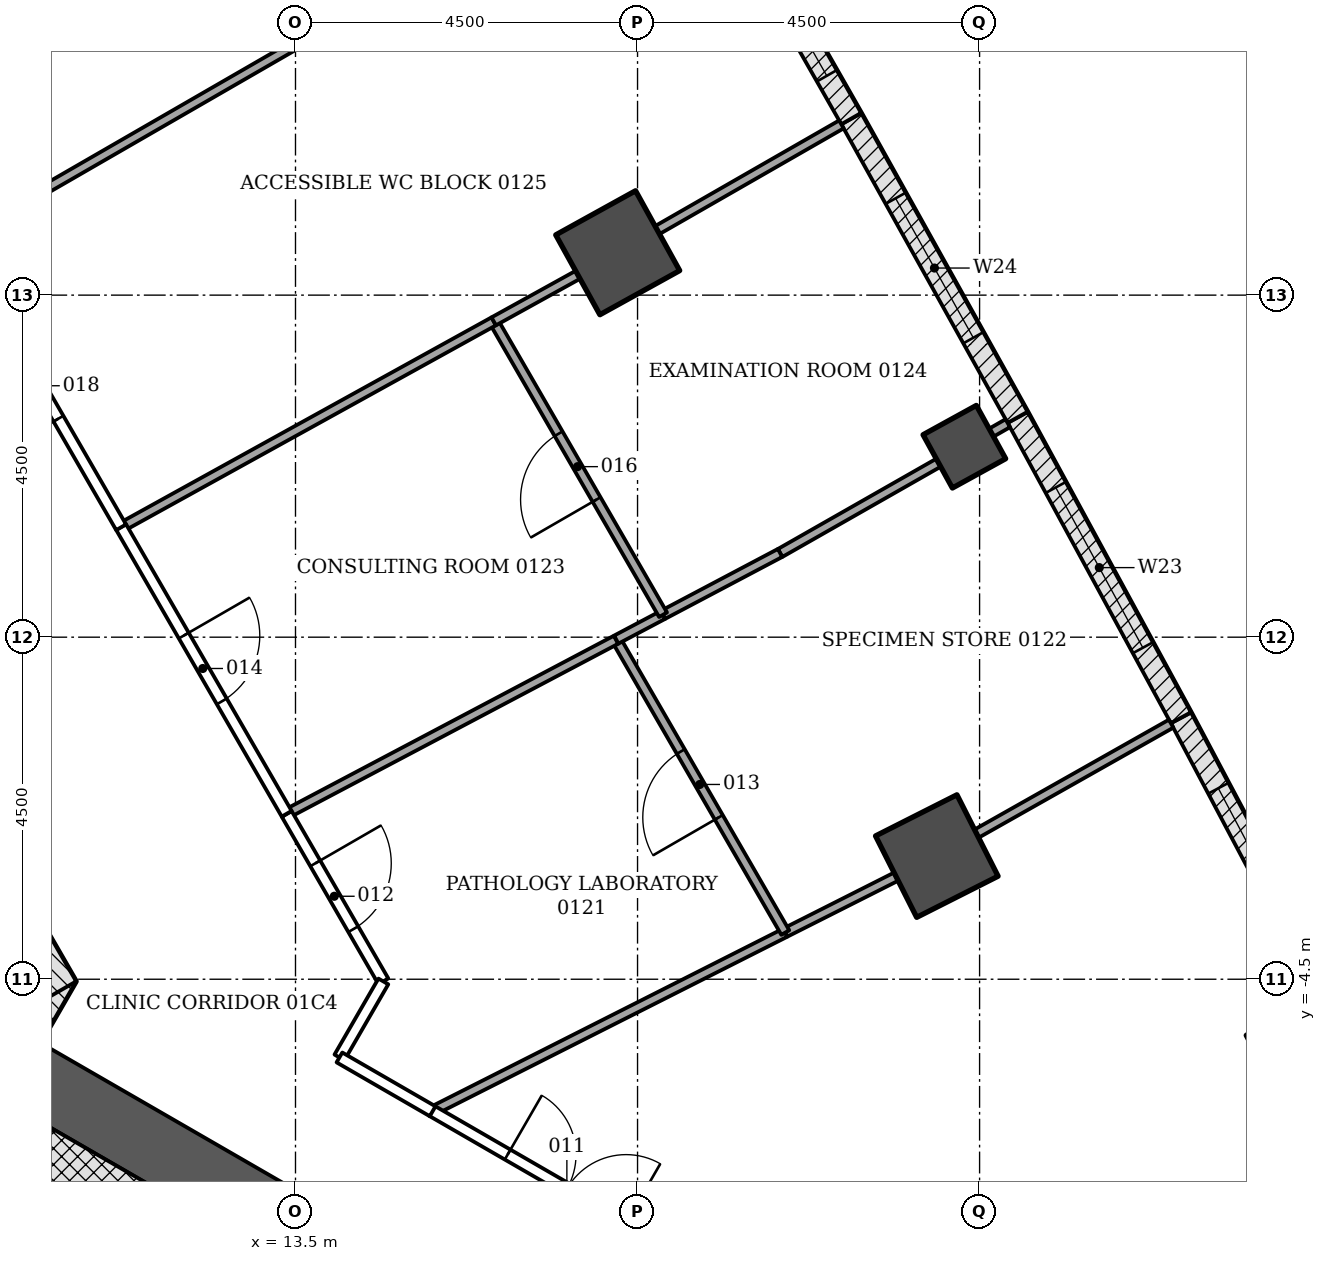
"""IFC4 building model, lengths in metres.
Left out: names, types, materials, properties, quantities, classifications, styles, units other than length and angle.
Written with IfcOpenShell. Run it as: python <this file> out.ifc"""

import sys

from ifc_helpers import new_model, si_unit, direction, frame, frame_2d, origin, origin_2d, place, context, subcontext, project, spatial, rectangle, extrude, element, fill, save


model = new_model("IFC4")
c1 = context("Model", 3, precision=1e-05, world=origin(), true_north=direction((0.0, 1.0)))
c2 = subcontext(c1, "Body", "Model", "MODEL_VIEW")
j1 = project(units=[si_unit("LENGTHUNIT", "METRE"), si_unit("PLANEANGLEUNIT", "RADIAN")], contexts=[c1])
p1 = place(None, origin())
s1 = spatial("IfcSite", under=j1, at=p1, CompositionType="ELEMENT")
p2 = place(p1, origin())
s2 = spatial("IfcBuilding", under=s1, at=p2, CompositionType="ELEMENT")
p3 = place(p2, frame((0.0, 0.0, 6.0)))
s3 = spatial("IfcBuildingStorey", under=s2, at=p3, CompositionType="ELEMENT", Elevation=6.0)
for number, where, z_axis, x_axis in (
    (1, (21.937, -2.88, -0.25), (0.0, 0.0, 1.0), (0.893, 0.451, 0.0)),
    (2, (17.739, 5.058, -0.25), (0.0, 0.0, 1.0), (0.875, 0.484, 0.0)),
):
    element("IfcColumn", number, at=place(p3, frame(where, z_axis=z_axis, x_axis=x_axis)), inside=s3, PredefinedType="COLUMN", context=c2, shape_type="SweptSolid", body=[
        extrude(rectangle(XDim=1.2, YDim=1.2, at=origin_2d()), origin(), (0.0, 0.0, 1.0), 4.5),
    ])
for number, where, z_axis, x_axis in (
    (3, (26.548, -5.406, -0.25), (0.0, 0.0, 1.0), (0.886, 0.464, 0.0)),
    (4, (22.3, 2.506, -0.25), (0.0, 0.0, 1.0), (0.876, 0.482, 0.0)),
):
    element("IfcColumn", number, at=place(p3, frame(where, z_axis=z_axis, x_axis=x_axis)), inside=s3, PredefinedType="COLUMN", context=c2, shape_type="SweptSolid", body=[
        extrude(rectangle(XDim=0.8, YDim=0.8, at=origin_2d()), origin(), (0.0, 0.0, 1.0), 4.5),
    ])
p4 = place(p3, frame((8.926, -6.753, -0.25), z_axis=(0.0, 0.0, 1.0), x_axis=(0.500042739161, 0.866000726912, 0.0)))
e5 = element("IfcWall", 5, at=p4, inside=s3, PredefinedType="SHEAR", context=c2, shape_type="SweptSolid", body=[
    extrude(rectangle(XDim=2.771, YDim=0.7, at=frame_2d((1.386, 0.0))), origin(), (0.0, 0.0, 1.0), 4.5),
])
p5 = place(p3, frame((10.311, -4.703, -0.25), z_axis=(0.0, 0.0, 1.0), x_axis=(-0.500001446645, 0.866024568562, 0.0)))
e6 = element("IfcWall", 6, at=p5, inside=s3, PredefinedType="SHEAR", context=c2, shape_type="SweptSolid", body=[
    extrude(rectangle(XDim=18.458, YDim=0.7, at=frame_2d((9.229, 0.0))), origin(), (0.0, 0.0, 1.0), 4.5),
])
p6 = place(p5, frame((8.7, 0.0, 0.25)))
e7 = element("IfcOpeningElement", 7, at=p6, cuts=e6, PredefinedType="OPENING", context=c2, shape_type="SweptSolid", body=[
    extrude(rectangle(XDim=1.0, YDim=2.1, at=frame_2d((0.5, 1.05))), frame((0.0, 0.36, 0.0), z_axis=(0.0, -1.0, 0.0), x_axis=(1.0, 0.0, 0.0)), (0.0, 0.0, 1.0), 0.72),
])
p7 = place(p5, frame((4.002, 0.0, 0.25)))
e8 = element("IfcOpeningElement", 8, at=p7, cuts=e6, PredefinedType="OPENING", context=c2, shape_type="SweptSolid", body=[
    extrude(rectangle(XDim=0.9, YDim=2.1, at=frame_2d((0.45, 1.05))), frame((0.0, 0.36, 0.0), z_axis=(0.0, -1.0, 0.0), x_axis=(1.0, 0.0, 0.0)), (0.0, 0.0, 1.0), 0.72),
])
p8 = place(p5, frame((14.093, 0.0, 0.25)))
e9 = element("IfcOpeningElement", 9, at=p8, cuts=e6, PredefinedType="OPENING", context=c2, shape_type="SweptSolid", body=[
    extrude(rectangle(XDim=0.9, YDim=2.1, at=frame_2d((0.45, 1.05))), frame((0.0, 0.36, 0.0), z_axis=(0.0, -1.0, 0.0), x_axis=(1.0, 0.0, 0.0)), (0.0, 0.0, 1.0), 0.72),
])
p9 = place(p3, frame((9.922, -5.728, -0.25), z_axis=(0.0, 0.0, 1.0), x_axis=(0.866028046028, -0.499995423472, 0.0)))
e10 = element("IfcWall", 10, at=p9, inside=s3, PredefinedType="SHEAR", context=c2, shape_type="SweptSolid", body=[
    extrude(rectangle(XDim=14.633, YDim=0.9, at=frame_2d((7.316, 0.0))), origin(), (0.0, 0.0, 1.0), 4.5),
])
p10 = place(p9, frame((7.35, 0.0, 0.25)))
e11 = element("IfcOpeningElement", 11, at=p10, cuts=e10, PredefinedType="OPENING", context=c2, shape_type="SweptSolid", body=[
    extrude(rectangle(XDim=1.5, YDim=2.1, at=frame_2d((0.75, 1.05))), frame((0.0, 0.46, 0.0), z_axis=(0.0, -1.0, 0.0), x_axis=(1.0, 0.0, 0.0)), (0.0, 0.0, 1.0), 0.92),
])
p11 = place(p3, frame((25.15, -1.062, 0.0), z_axis=(0.0, 0.0, 1.0), x_axis=(0.468566202388, -0.883428386447, 0.0)))
e12 = element("IfcWall", 12, at=p11, inside=s3, PredefinedType="NOTDEFINED", context=c2, shape_type="SweptSolid", body=[
    extrude(rectangle(XDim=4.496, YDim=0.3, at=frame_2d((2.248, 0.0))), origin(), (0.0, 0.0, 1.0), 4.25),
])
p12 = place(p11, frame((1.048, 0.0, 0.9)))
e13 = element("IfcOpeningElement", 13, at=p12, cuts=e12, PredefinedType="OPENING", context=c2, shape_type="SweptSolid", body=[
    extrude(rectangle(XDim=2.4, YDim=2.4, at=frame_2d((1.2, 1.2))), frame((0.0, 0.16, 0.0), z_axis=(0.0, -1.0, 0.0), x_axis=(1.0, 0.0, 0.0)), (0.0, 0.0, 1.0), 0.32),
])
p13 = place(p3, frame((23.001, 2.89, 0.0), z_axis=(0.0, 0.0, 1.0), x_axis=(0.477577109439, -0.878589838628, 0.0)))
e14 = element("IfcWall", 14, at=p13, inside=s3, PredefinedType="NOTDEFINED", context=c2, shape_type="SweptSolid", body=[
    extrude(rectangle(XDim=4.496, YDim=0.3, at=frame_2d((2.248, 0.0))), origin(), (0.0, 0.0, 1.0), 4.25),
])
p14 = place(p13, frame((1.048, 0.0, 0.9)))
e15 = element("IfcOpeningElement", 15, at=p14, cuts=e14, PredefinedType="OPENING", context=c2, shape_type="SweptSolid", body=[
    extrude(rectangle(XDim=2.4, YDim=2.4, at=frame_2d((1.2, 1.2))), frame((0.0, 0.16, 0.0), z_axis=(0.0, -1.0, 0.0), x_axis=(1.0, 0.0, 0.0)), (0.0, 0.0, 1.0), 0.32),
])
p15 = place(p3, frame((20.812, 6.82, 0.0), z_axis=(0.0, 0.0, 1.0), x_axis=(0.486606252415, -0.873621402617, 0.0)))
e16 = element("IfcWall", 16, at=p15, inside=s3, PredefinedType="NOTDEFINED", context=c2, shape_type="SweptSolid", body=[
    extrude(rectangle(XDim=4.496, YDim=0.3, at=frame_2d((2.248, 0.0))), origin(), (0.0, 0.0, 1.0), 4.25),
])
p16 = place(p15, frame((1.198, 0.0, 0.8)))
e17 = element("IfcOpeningElement", 17, at=p16, cuts=e16, PredefinedType="OPENING", context=c2, shape_type="SweptSolid", body=[
    extrude(rectangle(XDim=2.1, YDim=3.0, at=frame_2d((1.05, 1.5))), frame((0.0, 0.16, 0.0), z_axis=(0.0, -1.0, 0.0), x_axis=(1.0, 0.0, 0.0)), (0.0, 0.0, 1.0), 0.32),
])
p17 = place(p3, frame((18.583, 10.728, 0.0), z_axis=(0.0, 0.0, 1.0), x_axis=(0.495524760411, -0.868593812907, 0.0)))
e18 = element("IfcWall", 18, at=p17, inside=s3, PredefinedType="NOTDEFINED", context=c2, shape_type="SweptSolid", body=[
    extrude(rectangle(XDim=4.496, YDim=0.3, at=frame_2d((2.248, 0.0))), origin(), (0.0, 0.0, 1.0), 4.25),
])
p18 = place(p17, frame((0.648, 0.0, 0.8)))
e19 = element("IfcOpeningElement", 19, at=p18, cuts=e18, PredefinedType="OPENING", context=c2, shape_type="SweptSolid", body=[
    extrude(rectangle(XDim=3.2, YDim=2.7, at=frame_2d((1.6, 1.35))), frame((0.0, 0.16, 0.0), z_axis=(0.0, -1.0, 0.0), x_axis=(1.0, 0.0, 0.0)), (0.0, 0.0, 1.0), 0.32),
])
p19 = place(p3, frame((9.413, -6.61, -0.25), z_axis=(0.0, 0.0, 1.0), x_axis=(0.866018442252, -0.500012057535, 0.0)))
e20 = element("IfcWall", 20, at=p19, inside=s3, PredefinedType="SHEAR", context=c2, shape_type="SweptSolid", body=[
    extrude(rectangle(XDim=7.2, YDim=1.136, at=frame_2d((3.6, 0.0))), origin(), (0.0, 0.0, 1.0), 4.5),
])
p20 = place(p3, frame((19.942, -3.888, 0.0), z_axis=(0.0, 0.0, 1.0), x_axis=(-0.89239982182, -0.451245562877, 0.0)))
e21 = element("IfcWall", 21, at=p20, inside=s3, PredefinedType="PARTITIONING", context=c2, shape_type="SweptSolid", body=[
    extrude(rectangle(XDim=5.201, YDim=0.12, at=frame_2d((2.601, 0.0))), origin(), (0.0, 0.0, 1.0), 3.638),
])
p21 = place(p3, frame((21.401, -3.151, 0.0), z_axis=(0.0, 0.0, 1.0), x_axis=(-0.892653768212, -0.450742997834, 0.0)))
e22 = element("IfcWall", 22, at=p21, inside=s3, PredefinedType="PARTITIONING", context=c2, shape_type="SweptSolid", body=[
    extrude(rectangle(XDim=1.631, YDim=0.12, at=frame_2d((0.815, 0.0))), origin(), (0.0, 0.0, 1.0), 3.638),
])
p22 = place(p3, frame((25.02, -1.138, 0.0), z_axis=(0.0, 0.0, 1.0), x_axis=(-0.870620069476, -0.491955988505, 0.0)))
e23 = element("IfcWall", 23, at=p22, inside=s3, PredefinedType="PARTITIONING", context=c2, shape_type="SweptSolid", body=[
    extrude(rectangle(XDim=2.939, YDim=0.12, at=frame_2d((1.47, 0.0))), origin(), (0.0, 0.0, 1.0), 3.633),
])
p23 = place(p3, frame((15.295, -6.232, 0.0), z_axis=(0.0, 0.0, 1.0), x_axis=(0.865991915229, -0.500057999394, 0.0)))
e24 = element("IfcWall", 24, at=p23, inside=s3, PredefinedType="PARTITIONING", context=c2, shape_type="SweptSolid", body=[
    extrude(rectangle(XDim=4.094, YDim=0.15, at=frame_2d((2.047, 0.0))), origin(), (0.0, 0.0, 1.0), 3.638),
])
p24 = place(p23, frame((1.15, 0.0, 0.0)))
e25 = element("IfcOpeningElement", 25, at=p24, cuts=e24, PredefinedType="OPENING", context=c2, shape_type="SweptSolid", body=[
    extrude(rectangle(XDim=1.8, YDim=2.1, at=frame_2d((0.9, 1.05))), frame((0.0, 0.085, 0.0), z_axis=(0.0, -1.0, 0.0), x_axis=(1.0, 0.0, 0.0)), (0.0, 0.0, 1.0), 0.17),
])
p25 = place(p3, frame((19.944, -3.886, 0.0), z_axis=(0.0, 0.0, 1.0), x_axis=(-0.500092923031, 0.865971748, 0.0)))
e26 = element("IfcWall", 26, at=p25, inside=s3, PredefinedType="PARTITIONING", context=c2, shape_type="SweptSolid", body=[
    extrude(rectangle(XDim=4.449, YDim=0.12, at=frame_2d((2.225, 0.0))), origin(), (0.0, 0.0, 1.0), 3.638),
])
p26 = place(p25, frame((1.75, 0.0, 0.0)))
e27 = element("IfcOpeningElement", 27, at=p26, cuts=e26, PredefinedType="OPENING", context=c2, shape_type="SweptSolid", body=[
    extrude(rectangle(XDim=1.0, YDim=2.1, at=frame_2d((0.5, 1.05))), frame((0.0, 0.07, 0.0), z_axis=(0.0, -1.0, 0.0), x_axis=(1.0, 0.0, 0.0)), (0.0, 0.0, 1.0), 0.14),
])
p27 = place(p3, frame((17.717, -0.034, 0.0), z_axis=(0.0, 0.0, 1.0), x_axis=(-0.884117284138, -0.467265051003, 0.0)))
e28 = element("IfcWall", 28, at=p27, inside=s3, PredefinedType="PARTITIONING", context=c2, shape_type="SweptSolid", body=[
    extrude(rectangle(XDim=4.901, YDim=0.12, at=frame_2d((2.45, 0.0))), origin(), (0.0, 0.0, 1.0), 3.638),
])
p28 = place(p3, frame((13.385, -2.326, 0.0), z_axis=(0.0, 0.0, 1.0), x_axis=(0.500043940957, -0.866000032975, 0.0)))
e29 = element("IfcWall", 29, at=p28, inside=s3, PredefinedType="PARTITIONING", context=c2, shape_type="SweptSolid", body=[
    extrude(rectangle(XDim=2.542, YDim=0.15, at=frame_2d((1.271, 0.0))), origin(), (0.0, 0.0, 1.0), 3.638),
])
p29 = place(p28, frame((0.75, 0.0, 0.0)))
e30 = element("IfcOpeningElement", 30, at=p29, cuts=e29, PredefinedType="OPENING", context=c2, shape_type="SweptSolid", body=[
    extrude(rectangle(XDim=1.0, YDim=2.1, at=frame_2d((0.5, 1.05))), frame((0.0, 0.085, 0.0), z_axis=(0.0, -1.0, 0.0), x_axis=(1.0, 0.0, 0.0)), (0.0, 0.0, 1.0), 0.17),
])
p30 = place(p3, frame((14.656, -4.529, 0.0), z_axis=(0.0, 0.0, 1.0), x_axis=(-0.500502949238, -0.865734831114, 0.0)))
e31 = element("IfcWall", 31, at=p30, inside=s3, PredefinedType="PARTITIONING", context=c2, shape_type="SweptSolid", body=[
    extrude(rectangle(XDim=1.155, YDim=0.15, at=frame_2d((0.578, 0.0))), origin(), (0.0, 0.0, 1.0), 4.25),
])
p31 = place(p3, frame((14.078, -5.529, 0.0), z_axis=(0.0, 0.0, 1.0), x_axis=(0.865984561414, -0.500070734389, 0.0)))
e32 = element("IfcWall", 32, at=p31, inside=s3, PredefinedType="PARTITIONING", context=c2, shape_type="SweptSolid", body=[
    extrude(rectangle(XDim=1.416, YDim=0.15, at=frame_2d((0.708, 0.0))), origin(), (0.0, 0.0, 1.0), 3.638),
])
p32 = place(p3, frame((18.336, 0.294, 0.0), z_axis=(0.0, 0.0, 1.0), x_axis=(-0.883890154601, -0.467694552672, 0.0)))
e33 = element("IfcWall", 33, at=p32, inside=s3, PredefinedType="PARTITIONING", context=c2, shape_type="SweptSolid", body=[
    extrude(rectangle(XDim=0.697, YDim=0.12, at=frame_2d((0.348, 0.0))), origin(), (0.0, 0.0, 1.0), 3.638),
])
p33 = place(p3, frame((21.959, 2.295, 0.0), z_axis=(0.0, 0.0, 1.0), x_axis=(-0.868831589773, -0.49510773435, 0.0)))
e34 = element("IfcWall", 34, at=p33, inside=s3, PredefinedType="PARTITIONING", context=c2, shape_type="SweptSolid", body=[
    extrude(rectangle(XDim=2.397, YDim=0.12, at=frame_2d((1.199, 0.0))), origin(), (0.0, 0.0, 1.0), 3.638),
])
p34 = place(p3, frame((19.875, 1.108, 0.0), z_axis=(0.0, 0.0, 1.0), x_axis=(-0.884094940295, -0.467307325584, 0.0)))
e35 = element("IfcWall", 35, at=p34, inside=s3, PredefinedType="PARTITIONING", context=c2, shape_type="SweptSolid", body=[
    extrude(rectangle(XDim=1.74, YDim=0.12, at=frame_2d((0.87, 0.0))), origin(), (0.0, 0.0, 1.0), 3.638),
])
p35 = place(p3, frame((22.871, 2.815, 0.0), z_axis=(0.0, 0.0, 1.0), x_axis=(-0.867276603101, -0.497826569916, 0.0)))
e36 = element("IfcWall", 36, at=p35, inside=s3, PredefinedType="PARTITIONING", context=c2, shape_type="SweptSolid", body=[
    extrude(rectangle(XDim=0.249, YDim=0.12, at=frame_2d((0.125, 0.0))), origin(), (0.0, 0.0, 1.0), 4.25),
])
p36 = place(p3, frame((18.336, 0.295, 0.0), z_axis=(0.0, 0.0, 1.0), x_axis=(-0.499992780121, 0.866029572143, 0.0)))
e37 = element("IfcWall", 37, at=p36, inside=s3, PredefinedType="PARTITIONING", context=c2, shape_type="SweptSolid", body=[
    extrude(rectangle(XDim=4.456, YDim=0.12, at=frame_2d((2.228, 0.0))), origin(), (0.0, 0.0, 1.0), 3.638),
])
p37 = place(p36, frame((1.75, 0.0, 0.0)))
e38 = element("IfcOpeningElement", 38, at=p37, cuts=e37, PredefinedType="OPENING", context=c2, shape_type="SweptSolid", body=[
    extrude(rectangle(XDim=1.0, YDim=2.1, at=frame_2d((0.5, 1.05))), frame((0.0, 0.07, 0.0), z_axis=(0.0, -1.0, 0.0), x_axis=(1.0, 0.0, 0.0)), (0.0, 0.0, 1.0), 0.14),
])
p38 = place(p3, frame((11.205, 1.45, 0.0), z_axis=(0.0, 0.0, 1.0), x_axis=(0.50011048, -0.86596160873, 0.0)))
e39 = element("IfcWall", 39, at=p38, inside=s3, PredefinedType="PARTITIONING", context=c2, shape_type="SweptSolid", body=[
    extrude(rectangle(XDim=4.357, YDim=0.15, at=frame_2d((2.178, 0.0))), origin(), (0.0, 0.0, 1.0), 3.638),
])
p39 = place(p38, frame((1.65, 0.0, 0.0)))
e40 = element("IfcOpeningElement", 40, at=p39, cuts=e39, PredefinedType="OPENING", context=c2, shape_type="SweptSolid", body=[
    extrude(rectangle(XDim=1.0, YDim=2.1, at=frame_2d((0.5, 1.05))), frame((0.0, 0.085, 0.0), z_axis=(0.0, -1.0, 0.0), x_axis=(1.0, 0.0, 0.0)), (0.0, 0.0, 1.0), 0.17),
])
p40 = place(p3, frame((16.108, 4.155, 0.0), z_axis=(0.0, 0.0, 1.0), x_axis=(-0.87515505143, -0.483842573526, 0.0)))
e41 = element("IfcWall", 41, at=p40, inside=s3, PredefinedType="PARTITIONING", context=c2, shape_type="SweptSolid", body=[
    extrude(rectangle(XDim=5.599, YDim=0.12, at=frame_2d((2.799, 0.0))), origin(), (0.0, 0.0, 1.0), 3.638),
])
p41 = place(p3, frame((17.214, 4.767, 0.0), z_axis=(0.0, 0.0, 1.0), x_axis=(-0.874994011196, -0.484133742235, 0.0)))
e42 = element("IfcWall", 42, at=p41, inside=s3, PredefinedType="PARTITIONING", context=c2, shape_type="SweptSolid", body=[
    extrude(rectangle(XDim=1.264, YDim=0.12, at=frame_2d((0.632, 0.0))), origin(), (0.0, 0.0, 1.0), 3.638),
])
p42 = place(p3, frame((20.682, 6.746, 0.0), z_axis=(0.0, 0.0, 1.0), x_axis=(-0.867283853893, -0.49781393791, 0.0)))
e43 = element("IfcWall", 43, at=p42, inside=s3, PredefinedType="PARTITIONING", context=c2, shape_type="SweptSolid", body=[
    extrude(rectangle(XDim=2.792, YDim=0.12, at=frame_2d((1.396, 0.0))), origin(), (0.0, 0.0, 1.0), 3.633),
])
p43 = place(p3, frame((11.206, 1.446, 0.0), z_axis=(0.0, 0.0, 1.0), x_axis=(-0.500044734646, 0.865999574684, 0.0)))
e44 = element("IfcWall", 44, at=p43, inside=s3, PredefinedType="PARTITIONING", context=c2, shape_type="SweptSolid", body=[
    extrude(rectangle(XDim=4.35, YDim=0.15, at=frame_2d((2.175, 0.0))), origin(), (0.0, 0.0, 1.0), 3.638),
])
p44 = place(p43, frame((1.65, 0.0, 0.0)))
e45 = element("IfcOpeningElement", 45, at=p44, cuts=e44, PredefinedType="OPENING", context=c2, shape_type="SweptSolid", body=[
    extrude(rectangle(XDim=1.0, YDim=2.1, at=frame_2d((0.5, 1.05))), frame((0.0, 0.085, 0.0), z_axis=(0.0, -1.0, 0.0), x_axis=(1.0, 0.0, 0.0)), (0.0, 0.0, 1.0), 0.17),
])
p45 = place(p3, frame((14.4, 8.313, 0.0), z_axis=(0.0, 0.0, 1.0), x_axis=(-0.866114094298, -0.499846352051, 0.0)))
e46 = element("IfcWall", 46, at=p45, inside=s3, PredefinedType="PARTITIONING", context=c2, shape_type="SweptSolid", body=[
    extrude(rectangle(XDim=6.198, YDim=0.12, at=frame_2d((3.099, 0.0))), origin(), (0.0, 0.0, 1.0), 3.638),
])
p46 = place(p12, origin())
e47 = element("IfcWindow", 47, at=p46, inside=s3, PartitioningType="DOUBLE_PANEL_VERTICAL", PredefinedType="WINDOW", context=c2, shape_type="SweptSolid", body=[
    extrude(rectangle(XDim=2.4, YDim=2.4, at=frame_2d((1.2, 1.2))), frame((0.0, 0.03, 0.0), z_axis=(0.0, -1.0, 0.0), x_axis=(1.0, 0.0, 0.0)), (0.0, 0.0, 1.0), 0.06),
])
fill(e13, e47)
p47 = place(p14, origin())
e48 = element("IfcWindow", 48, at=p47, inside=s3, PartitioningType="DOUBLE_PANEL_VERTICAL", PredefinedType="WINDOW", context=c2, shape_type="SweptSolid", body=[
    extrude(rectangle(XDim=2.4, YDim=2.4, at=frame_2d((1.2, 1.2))), frame((0.0, 0.03, 0.0), z_axis=(0.0, -1.0, 0.0), x_axis=(1.0, 0.0, 0.0)), (0.0, 0.0, 1.0), 0.06),
])
fill(e15, e48)
p48 = place(p16, origin())
e49 = element("IfcWindow", 49, at=p48, inside=s3, PartitioningType="DOUBLE_PANEL_HORIZONTAL", PredefinedType="WINDOW", context=c2, shape_type="SweptSolid", body=[
    extrude(rectangle(XDim=2.1, YDim=3.0, at=frame_2d((1.05, 1.5))), frame((0.0, 0.03, 0.0), z_axis=(0.0, -1.0, 0.0), x_axis=(1.0, 0.0, 0.0)), (0.0, 0.0, 1.0), 0.06),
])
fill(e17, e49)
p49 = place(p18, origin())
e50 = element("IfcWindow", 50, at=p49, inside=s3, PartitioningType="TRIPLE_PANEL_VERTICAL", PredefinedType="WINDOW", context=c2, shape_type="SweptSolid", body=[
    extrude(rectangle(XDim=3.2, YDim=2.7, at=frame_2d((1.6, 1.35))), frame((0.0, 0.03, 0.0), z_axis=(0.0, -1.0, 0.0), x_axis=(1.0, 0.0, 0.0)), (0.0, 0.0, 1.0), 0.06),
])
fill(e19, e50)
p50 = place(p24, origin())
e51 = element("IfcDoor", 51, at=p50, inside=s3, OperationType="DOUBLE_DOOR_SINGLE_SWING", PredefinedType="DOOR", context=c2, shape_type="SweptSolid", body=[
    extrude(rectangle(XDim=1.8, YDim=2.1, at=frame_2d((0.9, 1.05))), frame((0.0, 0.025, 0.0), z_axis=(0.0, -1.0, 0.0), x_axis=(1.0, 0.0, 0.0)), (0.0, 0.0, 1.0), 0.05),
])
fill(e25, e51)
p51 = place(p29, origin())
e52 = element("IfcDoor", 52, at=p51, inside=s3, OperationType="SINGLE_SWING_LEFT", PredefinedType="DOOR", context=c2, shape_type="SweptSolid", body=[
    extrude(rectangle(XDim=1.0, YDim=2.1, at=frame_2d((0.5, 1.05))), frame((0.0, 0.025, 0.0), z_axis=(0.0, -1.0, 0.0), x_axis=(1.0, 0.0, 0.0)), (0.0, 0.0, 1.0), 0.05),
])
fill(e30, e52)
p52 = place(p26, origin())
e53 = element("IfcDoor", 53, at=p52, inside=s3, OperationType="SINGLE_SWING_LEFT", PredefinedType="DOOR", context=c2, shape_type="SweptSolid", body=[
    extrude(rectangle(XDim=1.0, YDim=2.1, at=frame_2d((0.5, 1.05))), frame((0.0, 0.025, 0.0), z_axis=(0.0, -1.0, 0.0), x_axis=(1.0, 0.0, 0.0)), (0.0, 0.0, 1.0), 0.05),
])
fill(e27, e53)
p53 = place(p39, origin())
e54 = element("IfcDoor", 54, at=p53, inside=s3, OperationType="SINGLE_SWING_LEFT", PredefinedType="DOOR", context=c2, shape_type="SweptSolid", body=[
    extrude(rectangle(XDim=1.0, YDim=2.1, at=frame_2d((0.5, 1.05))), frame((0.0, 0.025, 0.0), z_axis=(0.0, -1.0, 0.0), x_axis=(1.0, 0.0, 0.0)), (0.0, 0.0, 1.0), 0.05),
])
fill(e40, e54)
p54 = place(p37, origin())
e55 = element("IfcDoor", 55, at=p54, inside=s3, OperationType="SINGLE_SWING_LEFT", PredefinedType="DOOR", context=c2, shape_type="SweptSolid", body=[
    extrude(rectangle(XDim=1.0, YDim=2.1, at=frame_2d((0.5, 1.05))), frame((0.0, 0.025, 0.0), z_axis=(0.0, -1.0, 0.0), x_axis=(1.0, 0.0, 0.0)), (0.0, 0.0, 1.0), 0.05),
])
fill(e38, e55)
p55 = place(p44, origin())
e56 = element("IfcDoor", 56, at=p55, inside=s3, OperationType="SINGLE_SWING_RIGHT", PredefinedType="DOOR", context=c2, shape_type="SweptSolid", body=[
    extrude(rectangle(XDim=1.0, YDim=2.1, at=frame_2d((0.5, 1.05))), frame((0.0, 0.025, 0.0), z_axis=(0.0, -1.0, 0.0), x_axis=(1.0, 0.0, 0.0)), (0.0, 0.0, 1.0), 0.05),
])
fill(e45, e56)
save(model, sys.argv[1])
